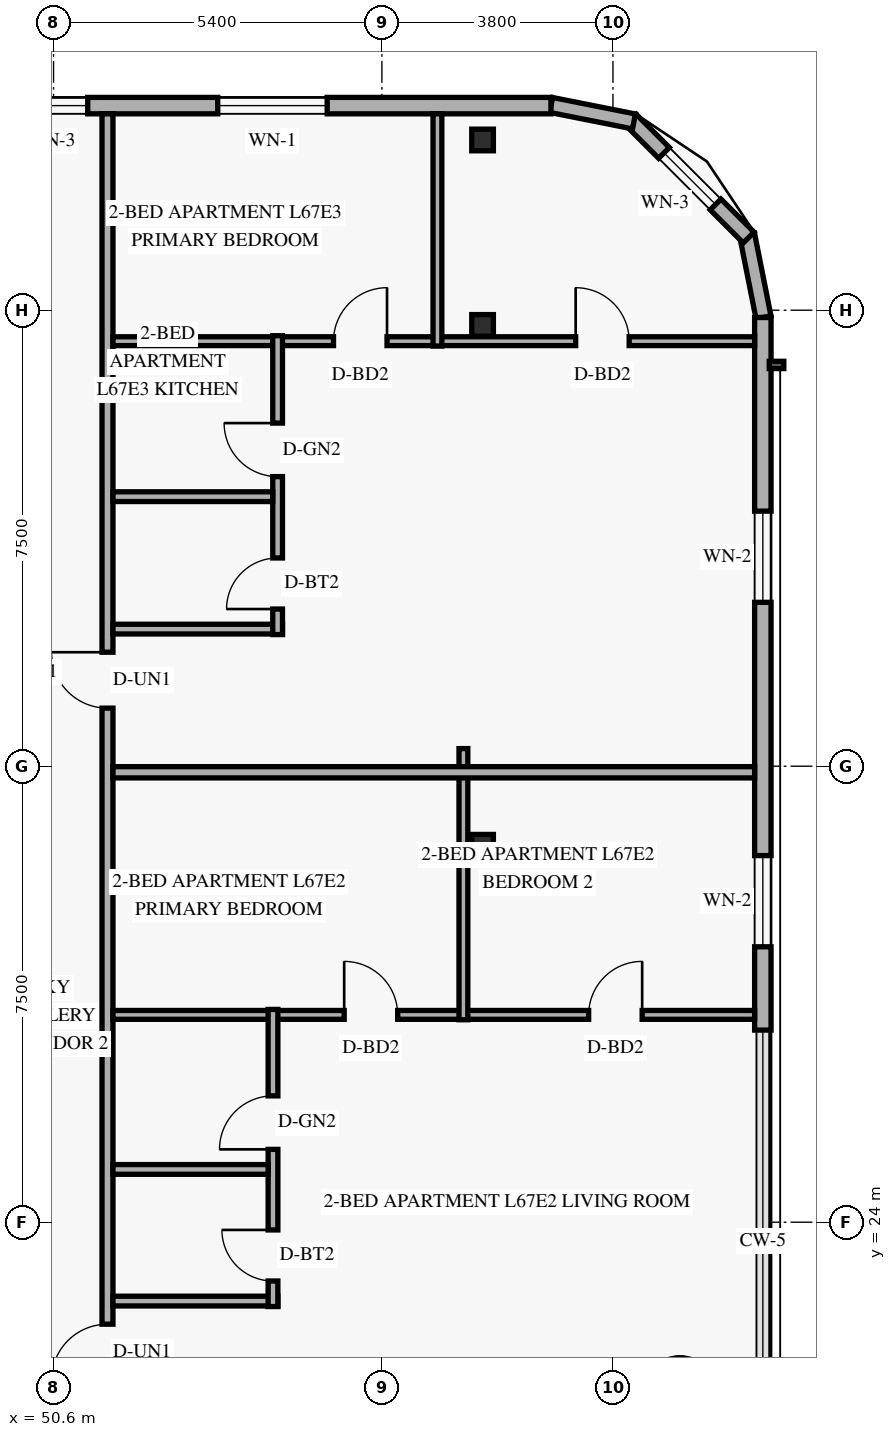
"""IFC4 building model, lengths in metres.
Left out: names, types, materials, properties, quantities, classifications, styles, units other than length and angle.
Written with IfcOpenShell. Run it as: python <this file> out.ifc"""

import sys

from ifc_helpers import new_model, si_unit, direction, frame, frame_2d, origin, origin_2d, place, context, subcontext, project, spatial, rectangle, hollow_rectangle, extrude, element, fill, save


model = new_model("IFC4")
c1 = context("Model", 3, precision=1e-05, world=origin(), true_north=direction((0.0, 1.0)))
c2 = subcontext(c1, "Body", "Model", "MODEL_VIEW")
j1 = project(units=[si_unit("LENGTHUNIT", "METRE"), si_unit("PLANEANGLEUNIT", "RADIAN")], contexts=[c1])
p1 = place(None, origin())
s1 = spatial("IfcSite", under=j1, at=p1, CompositionType="ELEMENT")
p2 = place(p1, origin())
s2 = spatial("IfcBuilding", under=s1, at=p2, CompositionType="ELEMENT")
p3 = place(p2, frame((0.0, 0.0, 256.8)))
s3 = spatial("IfcBuildingStorey", under=s2, at=p3, CompositionType="ELEMENT", Elevation=256.8)
for number, where, z_axis, x_axis in (
    (1, (57.551, 30.2, 0.0), (0.058, 0.0, 0.998), (0.0, 1.0, 0.0)),
    (2, (57.551, 38.75, 0.0), (0.058, 0.0, 0.998), (0.0, 1.0, 0.0)),
    (3, (57.551, 41.8, 0.0), (0.058, 0.0, 0.998), (0.0, 1.0, 0.0)),
):
    element("IfcColumn", number, at=place(p3, frame(where, z_axis=z_axis, x_axis=x_axis)), inside=s3, PredefinedType="COLUMN", context=c2, shape_type="SweptSolid", body=[
        extrude(hollow_rectangle(XDim=0.356, YDim=0.356, WallThickness=0.016, at=origin_2d()), origin(), (0.0, 0.0, 1.0), 3.606),
    ])
p4 = place(p3, frame((62.276, 38.884, 0.0), z_axis=(0.0, 0.0, 1.0), x_axis=(-0.195135625965, 0.9807762678, 0.0)))
e4 = element("IfcWall", 4, at=p4, inside=s3, PredefinedType="SOLIDWALL", context=c2, shape_type="SweptSolid", body=[
    extrude(rectangle(XDim=1.389, YDim=0.25, at=frame_2d((0.694, 0.0))), origin(), (0.0, 0.0, 1.0), 3.36),
])
p5 = place(p3, frame((62.032, 40.195, 0.0), z_axis=(0.0, 0.0, 1.0), x_axis=(-0.707106781187, 0.707106781187, 0.0)))
e5 = element("IfcWall", 5, at=p5, inside=s3, PredefinedType="SOLIDWALL", context=c2, shape_type="SweptSolid", body=[
    extrude(rectangle(XDim=2.739, YDim=0.25, at=frame_2d((1.37, 0.0))), origin(), (0.0, 0.0, 1.0), 3.36),
])
p6 = place(p5, frame((0.77, 0.0, 0.85)))
e6 = element("IfcOpeningElement", 6, at=p6, cuts=e5, PredefinedType="OPENING", context=c2, shape_type="SweptSolid", body=[
    extrude(rectangle(XDim=1.2, YDim=1.5, at=frame_2d((0.6, 0.75))), frame((0.0, 0.135, 0.0), z_axis=(0.0, -1.0, 0.0), x_axis=(1.0, 0.0, 0.0)), (0.0, 0.0, 1.0), 0.27),
])
p7 = place(p3, frame((60.146, 42.105, 0.0), z_axis=(0.0, 0.0, 1.0), x_axis=(-0.980809899341, 0.19496651342, 0.0)))
e7 = element("IfcWall", 7, at=p7, inside=s3, PredefinedType="SOLIDWALL", context=c2, shape_type="SweptSolid", body=[
    extrude(rectangle(XDim=1.389, YDim=0.25, at=frame_2d((0.694, 0.0))), origin(), (0.0, 0.0, 1.0), 3.36),
])
p8 = place(p3, frame((62.265, 27.16, 0.0), z_axis=(0.0, 0.0, 1.0), x_axis=(0.0, 1.0, 0.0)))
e8 = element("IfcWall", 8, at=p8, inside=s3, PredefinedType="SOLIDWALL", context=c2, shape_type="SweptSolid", body=[
    extrude(rectangle(XDim=11.72, YDim=0.27, at=frame_2d((5.86, 0.0))), origin(), (0.0, 0.0, 1.0), 3.36),
])
p9 = place(p8, frame((1.37, 0.0, 0.85)))
e9 = element("IfcOpeningElement", 9, at=p9, cuts=e8, PredefinedType="OPENING", context=c2, shape_type="SweptSolid", body=[
    extrude(rectangle(XDim=1.5, YDim=1.55, at=frame_2d((0.75, 0.775))), frame((0.0, 0.145, 0.0), z_axis=(0.0, -1.0, 0.0), x_axis=(1.0, 0.0, 0.0)), (0.0, 0.0, 1.0), 0.29),
])
p10 = place(p8, frame((7.035, 0.0, 0.85)))
e10 = element("IfcOpeningElement", 10, at=p10, cuts=e8, PredefinedType="OPENING", context=c2, shape_type="SweptSolid", body=[
    extrude(rectangle(XDim=1.5, YDim=1.55, at=frame_2d((0.75, 0.775))), frame((0.0, 0.145, 0.0), z_axis=(0.0, -1.0, 0.0), x_axis=(1.0, 0.0, 0.0)), (0.0, 0.0, 1.0), 0.29),
])
p11 = place(p3, frame((58.78, 42.365, 0.0), z_axis=(0.0, 0.0, 1.0), x_axis=(-1.0, 0.0, 0.0)))
e11 = element("IfcWall", 11, at=p11, inside=s3, PredefinedType="SOLIDWALL", context=c2, shape_type="SweptSolid", body=[
    extrude(rectangle(XDim=32.96, YDim=0.27, at=frame_2d((16.48, 0.0))), origin(), (0.0, 0.0, 1.0), 3.36),
])
p12 = place(p11, frame((27.59, 0.0, 0.85)))
e12 = element("IfcOpeningElement", 12, at=p12, cuts=e11, PredefinedType="OPENING", context=c2, shape_type="SweptSolid", body=[
    extrude(rectangle(XDim=1.8, YDim=1.6, at=frame_2d((0.9, 0.8))), frame((0.0, 0.145, 0.0), z_axis=(0.0, -1.0, 0.0), x_axis=(1.0, 0.0, 0.0)), (0.0, 0.0, 1.0), 0.29),
])
p13 = place(p11, frame((16.085, 0.0, 0.85)))
e13 = element("IfcOpeningElement", 13, at=p13, cuts=e11, PredefinedType="OPENING", context=c2, shape_type="SweptSolid", body=[
    extrude(rectangle(XDim=1.8, YDim=1.6, at=frame_2d((0.9, 0.8))), frame((0.0, 0.145, 0.0), z_axis=(0.0, -1.0, 0.0), x_axis=(1.0, 0.0, 0.0)), (0.0, 0.0, 1.0), 0.29),
])
p14 = place(p11, frame((11.261, 0.0, 0.85)))
e14 = element("IfcOpeningElement", 14, at=p14, cuts=e11, PredefinedType="OPENING", context=c2, shape_type="SweptSolid", body=[
    extrude(rectangle(XDim=1.8, YDim=1.6, at=frame_2d((0.9, 0.8))), frame((0.0, 0.145, 0.0), z_axis=(0.0, -1.0, 0.0), x_axis=(1.0, 0.0, 0.0)), (0.0, 0.0, 1.0), 0.29),
])
p15 = place(p11, frame((7.618, 0.0, 0.85)))
e15 = element("IfcOpeningElement", 15, at=p15, cuts=e11, PredefinedType="OPENING", context=c2, shape_type="SweptSolid", body=[
    extrude(rectangle(XDim=1.2, YDim=1.5, at=frame_2d((0.6, 0.75))), frame((0.0, 0.145, 0.0), z_axis=(0.0, -1.0, 0.0), x_axis=(1.0, 0.0, 0.0)), (0.0, 0.0, 1.0), 0.29),
])
p16 = place(p11, frame((3.68, 0.0, 0.85)))
e16 = element("IfcOpeningElement", 16, at=p16, cuts=e11, PredefinedType="OPENING", context=c2, shape_type="SweptSolid", body=[
    extrude(rectangle(XDim=1.8, YDim=1.6, at=frame_2d((0.9, 0.8))), frame((0.0, 0.145, 0.0), z_axis=(0.0, -1.0, 0.0), x_axis=(1.0, 0.0, 0.0)), (0.0, 0.0, 1.0), 0.29),
])
p17 = place(p3, frame((51.487, 5.77, 0.0), z_axis=(0.0, 0.0, 1.0), x_axis=(0.0, 1.0, 0.0)))
e17 = element("IfcWall", 17, at=p17, inside=s3, PredefinedType="STANDARD", context=c2, shape_type="SweptSolid", body=[
    extrude(rectangle(XDim=36.46, YDim=0.18, at=frame_2d((18.23, 0.0))), origin(), (0.0, 0.0, 1.0), 2.803),
])
p18 = place(p17, frame((8.907, 0.0, 0.0)))
e18 = element("IfcOpeningElement", 18, at=p18, cuts=e17, PredefinedType="OPENING", context=c2, shape_type="SweptSolid", body=[
    extrude(rectangle(XDim=0.92, YDim=2.15, at=frame_2d((0.46, 1.075))), frame((0.0, 0.1, 0.0), z_axis=(0.0, -1.0, 0.0), x_axis=(1.0, 0.0, 0.0)), (0.0, 0.0, 1.0), 0.2),
])
p19 = place(p17, frame((15.633, 0.0, 0.0)))
e19 = element("IfcOpeningElement", 19, at=p19, cuts=e17, PredefinedType="OPENING", context=c2, shape_type="SweptSolid", body=[
    extrude(rectangle(XDim=0.92, YDim=2.15, at=frame_2d((0.46, 1.075))), frame((0.0, 0.1, 0.0), z_axis=(0.0, -1.0, 0.0), x_axis=(1.0, 0.0, 0.0)), (0.0, 0.0, 1.0), 0.2),
])
p20 = place(p17, frame((26.685, 0.0, 0.0)))
e20 = element("IfcOpeningElement", 20, at=p20, cuts=e17, PredefinedType="OPENING", context=c2, shape_type="SweptSolid", body=[
    extrude(rectangle(XDim=0.92, YDim=2.15, at=frame_2d((0.46, 1.075))), frame((0.0, 0.1, 0.0), z_axis=(0.0, -1.0, 0.0), x_axis=(1.0, 0.0, 0.0)), (0.0, 0.0, 1.0), 0.2),
])
p21 = place(p3, frame((51.577, 27.41, 0.0), z_axis=(0.0, 0.0, 1.0), x_axis=(1.0, 0.0, 0.0)))
e21 = element("IfcWall", 21, at=p21, inside=s3, PredefinedType="PARTITIONING", context=c2, shape_type="SweptSolid", body=[
    extrude(rectangle(XDim=10.553, YDim=0.145, at=frame_2d((5.276, 0.0))), origin(), (0.0, 0.0, 1.0), 2.879),
])
p22 = place(p21, frame((3.803, 0.0, 0.0)))
e22 = element("IfcOpeningElement", 22, at=p22, cuts=e21, PredefinedType="OPENING", context=c2, shape_type="SweptSolid", body=[
    extrude(rectangle(XDim=0.88, YDim=2.14, at=frame_2d((0.44, 1.07))), frame((0.0, 0.083, 0.0), z_axis=(0.0, -1.0, 0.0), x_axis=(1.0, 0.0, 0.0)), (0.0, 0.0, 1.0), 0.165),
])
p23 = place(p21, frame((7.823, 0.0, 0.0)))
e23 = element("IfcOpeningElement", 23, at=p23, cuts=e21, PredefinedType="OPENING", context=c2, shape_type="SweptSolid", body=[
    extrude(rectangle(XDim=0.88, YDim=2.14, at=frame_2d((0.44, 1.07))), frame((0.0, 0.083, 0.0), z_axis=(0.0, -1.0, 0.0), x_axis=(1.0, 0.0, 0.0)), (0.0, 0.0, 1.0), 0.165),
])
p24 = place(p3, frame((51.577, 22.703, 0.0), z_axis=(0.0, 0.0, 1.0), x_axis=(1.0, 0.0, 0.0)))
e24 = element("IfcWall", 24, at=p24, inside=s3, PredefinedType="PLUMBINGWALL", context=c2, shape_type="SweptSolid", body=[
    extrude(rectangle(XDim=2.712, YDim=0.16, at=frame_2d((1.356, 0.0))), origin(), (0.0, 0.0, 1.0), 3.36),
])
p25 = place(p3, frame((54.209, 22.613, 0.0), z_axis=(0.0, 0.0, 1.0), x_axis=(0.0, 1.0, 0.0)))
e25 = element("IfcWall", 25, at=p25, inside=s3, PredefinedType="PLUMBINGWALL", context=c2, shape_type="SweptSolid", body=[
    extrude(rectangle(XDim=4.887, YDim=0.16, at=frame_2d((2.443, 0.0))), origin(), (0.0, 0.0, 1.0), 3.36),
])
p26 = place(p25, frame((0.42, 0.0, 0.0)))
e26 = element("IfcOpeningElement", 26, at=p26, cuts=e25, PredefinedType="OPENING", context=c2, shape_type="SweptSolid", body=[
    extrude(rectangle(XDim=0.84, YDim=2.12, at=frame_2d((0.42, 1.06))), frame((0.0, 0.09, 0.0), z_axis=(0.0, -1.0, 0.0), x_axis=(1.0, 0.0, 0.0)), (0.0, 0.0, 1.0), 0.18),
])
p27 = place(p25, frame((2.585, 0.0, 0.0)))
e27 = element("IfcOpeningElement", 27, at=p27, cuts=e25, PredefinedType="OPENING", context=c2, shape_type="SweptSolid", body=[
    extrude(rectangle(XDim=0.88, YDim=2.12, at=frame_2d((0.44, 1.06))), frame((0.0, 0.09, 0.0), z_axis=(0.0, -1.0, 0.0), x_axis=(1.0, 0.0, 0.0)), (0.0, 0.0, 1.0), 0.18),
])
p28 = place(p3, frame((51.577, 24.868, 0.0), z_axis=(0.0, 0.0, 1.0), x_axis=(1.0, 0.0, 0.0)))
e28 = element("IfcWall", 28, at=p28, inside=s3, PredefinedType="PLUMBINGWALL", context=c2, shape_type="SweptSolid", body=[
    extrude(rectangle(XDim=2.552, YDim=0.16, at=frame_2d((1.276, 0.0))), origin(), (0.0, 0.0, 1.0), 3.36),
])
p29 = place(p3, frame((57.34, 27.33, 0.0), z_axis=(0.0, 0.0, 1.0), x_axis=(0.0, 1.0, 0.0)))
e29 = element("IfcWall", 29, at=p29, inside=s3, PredefinedType="PARTITIONING", context=c2, shape_type="SweptSolid", body=[
    extrude(rectangle(XDim=4.46, YDim=0.145, at=frame_2d((2.23, 0.0))), origin(), (0.0, 0.0, 1.0), 2.803),
])
p30 = place(p3, frame((51.577, 31.4, 0.0), z_axis=(0.0, 0.0, 1.0), x_axis=(1.0, 0.0, 0.0)))
e30 = element("IfcWall", 30, at=p30, inside=s3, PredefinedType="PARTITIONING", context=c2, shape_type="SweptSolid", body=[
    extrude(rectangle(XDim=10.553, YDim=0.185, at=frame_2d((5.276, 0.0))), origin(), (0.0, 0.0, 1.0), 2.879),
])
p31 = place(p3, frame((51.577, 38.49, 0.0), z_axis=(0.0, 0.0, 1.0), x_axis=(1.0, 0.0, 0.0)))
e31 = element("IfcWall", 31, at=p31, inside=s3, PredefinedType="PARTITIONING", context=c2, shape_type="SweptSolid", body=[
    extrude(rectangle(XDim=10.553, YDim=0.145, at=frame_2d((5.276, 0.0))), origin(), (0.0, 0.0, 1.0), 2.879),
])
p32 = place(p31, frame((3.627, 0.0, 0.0)))
e32 = element("IfcOpeningElement", 32, at=p32, cuts=e31, PredefinedType="OPENING", context=c2, shape_type="SweptSolid", body=[
    extrude(rectangle(XDim=0.88, YDim=2.14, at=frame_2d((0.44, 1.07))), frame((0.0, 0.083, 0.0), z_axis=(0.0, -1.0, 0.0), x_axis=(1.0, 0.0, 0.0)), (0.0, 0.0, 1.0), 0.165),
])
p33 = place(p31, frame((7.61, 0.0, 0.0)))
e33 = element("IfcOpeningElement", 33, at=p33, cuts=e31, PredefinedType="OPENING", context=c2, shape_type="SweptSolid", body=[
    extrude(rectangle(XDim=0.88, YDim=2.14, at=frame_2d((0.44, 1.07))), frame((0.0, 0.083, 0.0), z_axis=(0.0, -1.0, 0.0), x_axis=(1.0, 0.0, 0.0)), (0.0, 0.0, 1.0), 0.165),
])
p34 = place(p3, frame((51.577, 33.755, 0.0), z_axis=(0.0, 0.0, 1.0), x_axis=(1.0, 0.0, 0.0)))
e34 = element("IfcWall", 34, at=p34, inside=s3, PredefinedType="PLUMBINGWALL", context=c2, shape_type="SweptSolid", body=[
    extrude(rectangle(XDim=2.788, YDim=0.16, at=frame_2d((1.394, 0.0))), origin(), (0.0, 0.0, 1.0), 3.36),
])
p35 = place(p3, frame((54.285, 33.665, 0.0), z_axis=(0.0, 0.0, 1.0), x_axis=(0.0, 1.0, 0.0)))
e35 = element("IfcWall", 35, at=p35, inside=s3, PredefinedType="PLUMBINGWALL", context=c2, shape_type="SweptSolid", body=[
    extrude(rectangle(XDim=4.916, YDim=0.16, at=frame_2d((2.458, 0.0))), origin(), (0.0, 0.0, 1.0), 3.039),
])
p36 = place(p35, frame((0.42, 0.0, 0.0)))
e36 = element("IfcOpeningElement", 36, at=p36, cuts=e35, PredefinedType="OPENING", context=c2, shape_type="SweptSolid", body=[
    extrude(rectangle(XDim=0.84, YDim=2.12, at=frame_2d((0.42, 1.06))), frame((0.0, 0.09, 0.0), z_axis=(0.0, -1.0, 0.0), x_axis=(1.0, 0.0, 0.0)), (0.0, 0.0, 1.0), 0.18),
])
p37 = place(p35, frame((2.598, 0.0, 0.0)))
e37 = element("IfcOpeningElement", 37, at=p37, cuts=e35, PredefinedType="OPENING", context=c2, shape_type="SweptSolid", body=[
    extrude(rectangle(XDim=0.88, YDim=2.12, at=frame_2d((0.44, 1.06))), frame((0.0, 0.09, 0.0), z_axis=(0.0, -1.0, 0.0), x_axis=(1.0, 0.0, 0.0)), (0.0, 0.0, 1.0), 0.18),
])
p38 = place(p3, frame((51.577, 35.933, 0.0), z_axis=(0.0, 0.0, 1.0), x_axis=(1.0, 0.0, 0.0)))
e38 = element("IfcWall", 38, at=p38, inside=s3, PredefinedType="PLUMBINGWALL", context=c2, shape_type="SweptSolid", body=[
    extrude(rectangle(XDim=2.628, YDim=0.16, at=frame_2d((1.314, 0.0))), origin(), (0.0, 0.0, 1.0), 3.36),
])
p39 = place(p3, frame((56.914, 38.41, 0.0), z_axis=(0.0, 0.0, 1.0), x_axis=(0.0, 1.0, 0.0)))
e39 = element("IfcWall", 39, at=p39, inside=s3, PredefinedType="PARTITIONING", context=c2, shape_type="SweptSolid", body=[
    extrude(rectangle(XDim=3.82, YDim=0.145, at=frame_2d((1.91, 0.0))), origin(), (0.0, 0.0, 1.0), 2.803),
])
p40 = place(p6, origin())
e40 = element("IfcWindow", 40, at=p40, inside=s3, PartitioningType="SINGLE_PANEL", PredefinedType="WINDOW", context=c2, shape_type="SweptSolid", body=[
    extrude(rectangle(XDim=1.2, YDim=1.5, at=frame_2d((0.6, 0.75))), frame((0.0, 0.03, 0.0), z_axis=(0.0, -1.0, 0.0), x_axis=(1.0, 0.0, 0.0)), (0.0, 0.0, 1.0), 0.06),
])
fill(e6, e40)
p41 = place(p9, origin())
e41 = element("IfcWindow", 41, at=p41, inside=s3, PartitioningType="SINGLE_PANEL", PredefinedType="WINDOW", context=c2, shape_type="SweptSolid", body=[
    extrude(rectangle(XDim=1.5, YDim=1.55, at=frame_2d((0.75, 0.775))), frame((0.0, 0.03, 0.0), z_axis=(0.0, -1.0, 0.0), x_axis=(1.0, 0.0, 0.0)), (0.0, 0.0, 1.0), 0.06),
])
fill(e9, e41)
p42 = place(p10, origin())
e42 = element("IfcWindow", 42, at=p42, inside=s3, PartitioningType="SINGLE_PANEL", PredefinedType="WINDOW", context=c2, shape_type="SweptSolid", body=[
    extrude(rectangle(XDim=1.5, YDim=1.55, at=frame_2d((0.75, 0.775))), frame((0.0, 0.03, 0.0), z_axis=(0.0, -1.0, 0.0), x_axis=(1.0, 0.0, 0.0)), (0.0, 0.0, 1.0), 0.06),
])
fill(e10, e42)
p43 = place(p15, origin())
e43 = element("IfcWindow", 43, at=p43, inside=s3, PartitioningType="SINGLE_PANEL", PredefinedType="WINDOW", context=c2, shape_type="SweptSolid", body=[
    extrude(rectangle(XDim=1.2, YDim=1.5, at=frame_2d((0.6, 0.75))), frame((0.0, 0.03, 0.0), z_axis=(0.0, -1.0, 0.0), x_axis=(1.0, 0.0, 0.0)), (0.0, 0.0, 1.0), 0.06),
])
fill(e15, e43)
p44 = place(p16, origin())
e44 = element("IfcWindow", 44, at=p44, inside=s3, PartitioningType="SINGLE_PANEL", PredefinedType="WINDOW", context=c2, shape_type="SweptSolid", body=[
    extrude(rectangle(XDim=1.8, YDim=1.6, at=frame_2d((0.9, 0.8))), frame((0.0, 0.03, 0.0), z_axis=(0.0, -1.0, 0.0), x_axis=(1.0, 0.0, 0.0)), (0.0, 0.0, 1.0), 0.06),
])
fill(e16, e44)
p45 = place(p19, origin())
e45 = element("IfcDoor", 45, at=p45, inside=s3, OperationType="SINGLE_SWING_LEFT", PredefinedType="DOOR", context=c2, shape_type="SweptSolid", body=[
    extrude(rectangle(XDim=0.92, YDim=2.15, at=frame_2d((0.46, 1.075))), frame((0.0, 0.025, 0.0), z_axis=(0.0, -1.0, 0.0), x_axis=(1.0, 0.0, 0.0)), (0.0, 0.0, 1.0), 0.05),
])
fill(e19, e45)
p46 = place(p26, origin())
e46 = element("IfcDoor", 46, at=p46, inside=s3, OperationType="SINGLE_SWING_RIGHT", PredefinedType="DOOR", context=c2, shape_type="SweptSolid", body=[
    extrude(rectangle(XDim=0.84, YDim=2.12, at=frame_2d((0.42, 1.06))), frame((0.0, 0.025, 0.0), z_axis=(0.0, -1.0, 0.0), x_axis=(1.0, 0.0, 0.0)), (0.0, 0.0, 1.0), 0.05),
])
fill(e26, e46)
p47 = place(p27, origin())
e47 = element("IfcDoor", 47, at=p47, inside=s3, OperationType="SINGLE_SWING_LEFT", PredefinedType="DOOR", context=c2, shape_type="SweptSolid", body=[
    extrude(rectangle(XDim=0.88, YDim=2.12, at=frame_2d((0.44, 1.06))), frame((0.0, 0.025, 0.0), z_axis=(0.0, -1.0, 0.0), x_axis=(1.0, 0.0, 0.0)), (0.0, 0.0, 1.0), 0.05),
])
fill(e27, e47)
p48 = place(p22, origin())
e48 = element("IfcDoor", 48, at=p48, inside=s3, OperationType="SINGLE_SWING_LEFT", PredefinedType="DOOR", context=c2, shape_type="SweptSolid", body=[
    extrude(rectangle(XDim=0.88, YDim=2.14, at=frame_2d((0.44, 1.07))), frame((0.0, 0.025, 0.0), z_axis=(0.0, -1.0, 0.0), x_axis=(1.0, 0.0, 0.0)), (0.0, 0.0, 1.0), 0.05),
])
fill(e22, e48)
p49 = place(p23, origin())
e49 = element("IfcDoor", 49, at=p49, inside=s3, OperationType="SINGLE_SWING_RIGHT", PredefinedType="DOOR", context=c2, shape_type="SweptSolid", body=[
    extrude(rectangle(XDim=0.88, YDim=2.14, at=frame_2d((0.44, 1.07))), frame((0.0, 0.025, 0.0), z_axis=(0.0, -1.0, 0.0), x_axis=(1.0, 0.0, 0.0)), (0.0, 0.0, 1.0), 0.05),
])
fill(e23, e49)
p50 = place(p20, origin())
e50 = element("IfcDoor", 50, at=p50, inside=s3, OperationType="SINGLE_SWING_RIGHT", PredefinedType="DOOR", context=c2, shape_type="SweptSolid", body=[
    extrude(rectangle(XDim=0.92, YDim=2.15, at=frame_2d((0.46, 1.075))), frame((0.0, 0.025, 0.0), z_axis=(0.0, -1.0, 0.0), x_axis=(1.0, 0.0, 0.0)), (0.0, 0.0, 1.0), 0.05),
])
fill(e20, e50)
p51 = place(p36, origin())
e51 = element("IfcDoor", 51, at=p51, inside=s3, OperationType="SINGLE_SWING_LEFT", PredefinedType="DOOR", context=c2, shape_type="SweptSolid", body=[
    extrude(rectangle(XDim=0.84, YDim=2.12, at=frame_2d((0.42, 1.06))), frame((0.0, 0.025, 0.0), z_axis=(0.0, -1.0, 0.0), x_axis=(1.0, 0.0, 0.0)), (0.0, 0.0, 1.0), 0.05),
])
fill(e36, e51)
p52 = place(p37, origin())
e52 = element("IfcDoor", 52, at=p52, inside=s3, OperationType="SINGLE_SWING_RIGHT", PredefinedType="DOOR", context=c2, shape_type="SweptSolid", body=[
    extrude(rectangle(XDim=0.88, YDim=2.12, at=frame_2d((0.44, 1.06))), frame((0.0, 0.025, 0.0), z_axis=(0.0, -1.0, 0.0), x_axis=(1.0, 0.0, 0.0)), (0.0, 0.0, 1.0), 0.05),
])
fill(e37, e52)
p53 = place(p32, origin())
e53 = element("IfcDoor", 53, at=p53, inside=s3, OperationType="SINGLE_SWING_RIGHT", PredefinedType="DOOR", context=c2, shape_type="SweptSolid", body=[
    extrude(rectangle(XDim=0.88, YDim=2.14, at=frame_2d((0.44, 1.07))), frame((0.0, 0.025, 0.0), z_axis=(0.0, -1.0, 0.0), x_axis=(1.0, 0.0, 0.0)), (0.0, 0.0, 1.0), 0.05),
])
fill(e32, e53)
p54 = place(p33, origin())
e54 = element("IfcDoor", 54, at=p54, inside=s3, OperationType="SINGLE_SWING_LEFT", PredefinedType="DOOR", context=c2, shape_type="SweptSolid", body=[
    extrude(rectangle(XDim=0.88, YDim=2.14, at=frame_2d((0.44, 1.07))), frame((0.0, 0.025, 0.0), z_axis=(0.0, -1.0, 0.0), x_axis=(1.0, 0.0, 0.0)), (0.0, 0.0, 1.0), 0.05),
])
fill(e33, e54)
save(model, sys.argv[1])
